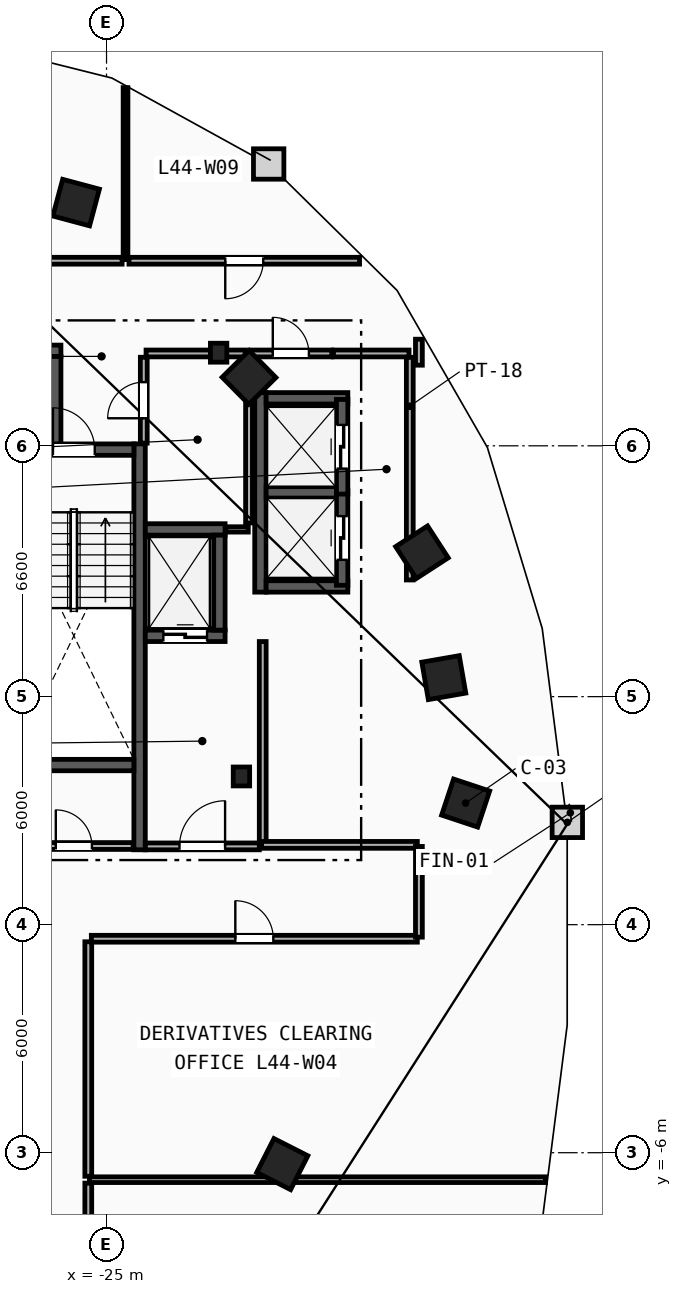
"""IFC4 building model, lengths in metres.
Left out: names, types, materials, properties, quantities, classifications, styles, units other than length and angle.
Written with IfcOpenShell. Run it as: python <this file> out.ifc"""

import sys

from ifc_helpers import new_model, si_unit, direction, frame, frame_2d, origin, origin_2d, place, context, subcontext, project, spatial, rectangle, i_section, extrude, element, fill, save


model = new_model("IFC4")
c1 = context("Model", 3, precision=1e-05, world=origin(), true_north=direction((0.0, 1.0)))
c2 = subcontext(c1, "Body", "Model", "MODEL_VIEW")
j1 = project(units=[si_unit("LENGTHUNIT", "METRE"), si_unit("PLANEANGLEUNIT", "RADIAN")], contexts=[c1])
p1 = place(None, origin())
s1 = spatial("IfcSite", under=j1, at=p1, CompositionType="ELEMENT")
p2 = place(p1, origin())
s2 = spatial("IfcBuilding", under=s1, at=p2, CompositionType="ELEMENT")
p3 = place(p2, frame((0.0, 0.0, 169.2)))
s3 = spatial("IfcBuildingStorey", under=s2, at=p3, CompositionType="ELEMENT", Elevation=169.2)
for number, where, z_axis, x_axis in (
    (1, (-21.45, 3.9, 0.0), (0.0, 0.0, 1.0), (1.0, 0.0, 0.0)),
    (2, (-22.05, 15.05, 0.0), (0.0, 0.0, 1.0), (1.0, 0.0, 0.0)),
):
    element("IfcColumn", number, at=place(p3, frame(where, z_axis=z_axis, x_axis=x_axis)), inside=s3, PredefinedType="COLUMN", context=c2, shape_type="SweptSolid", body=[
        extrude(i_section(OverallWidth=0.432, OverallDepth=0.498, WebThickness=0.056, FlangeThickness=0.089, FilletRadius=0.018, at=origin_2d()), origin(), (0.0, 0.0, 1.0), 3.6),
    ])
for number, where, z_axis, x_axis in (
    (3, (-15.55, 3.2, 0.0), (0.0, 0.0, 1.0), (0.315, 0.949, 0.0)),
    (4, (-16.125, 6.5, 0.0), (0.0, 0.0, 1.0), (-0.172, 0.985, 0.0)),
    (5, (-16.7, 9.8, 0.0), (0.0, 0.0, 1.0), (-0.544, 0.839, 0.0)),
    (6, (-21.25, 14.4, 0.0), (0.0, 0.0, 1.0), (-0.703, 0.711, 0.0)),
    (7, (-25.8, 19.0, 0.0), (0.0, 0.0, 1.0), (-0.966, 0.259, 0.0)),
    (8, (-20.375, -6.3, 0.0), (0.0, 0.0, 1.0), (0.453, 0.892, 0.0)),
):
    element("IfcColumn", number, at=place(p3, frame(where, z_axis=z_axis, x_axis=x_axis)), inside=s3, PredefinedType="COLUMN", context=c2, shape_type="SweptSolid", body=[
        extrude(rectangle(XDim=1.0, YDim=1.0, at=origin_2d()), origin(), (0.0, 0.0, 1.0), 3.6),
    ])
p4 = place(p3, frame((-24.13, 1.97, 0.0), z_axis=(0.0, 0.0, 1.0), x_axis=(0.0, 1.0, 0.0)))
e9 = element("IfcWall", 9, at=p4, inside=s3, PredefinedType="SHEAR", context=c2, shape_type="SweptSolid", body=[
    extrude(rectangle(XDim=10.68, YDim=0.3, at=frame_2d((5.34, 0.0))), origin(), (0.0, 0.0, 1.0), 3.36),
])
p5 = place(p3, frame((-27.44, 12.5, 0.0), z_axis=(0.0, 0.0, 1.0), x_axis=(1.0, 0.0, 0.0)))
e10 = element("IfcWall", 10, at=p5, inside=s3, PredefinedType="SHEAR", context=c2, shape_type="SweptSolid", body=[
    extrude(rectangle(XDim=3.16, YDim=0.3, at=frame_2d((1.58, 0.0))), origin(), (0.0, 0.0, 1.0), 3.36),
])
p6 = place(p5, frame((1.03, 0.0, 0.0)))
e11 = element("IfcOpeningElement", 11, at=p6, cuts=e10, PredefinedType="OPENING", context=c2, shape_type="SweptSolid", body=[
    extrude(rectangle(XDim=1.1, YDim=2.15, at=frame_2d((0.55, 1.075))), frame((0.0, 0.16, 0.0), z_axis=(0.0, -1.0, 0.0), x_axis=(1.0, 0.0, 0.0)), (0.0, 0.0, 1.0), 0.32),
])
p7 = place(p3, frame((-27.44, 4.2, 0.0), z_axis=(0.0, 0.0, 1.0), x_axis=(1.0, 0.0, 0.0)))
e12 = element("IfcWall", 12, at=p7, inside=s3, PredefinedType="SHEAR", context=c2, shape_type="SweptSolid", body=[
    extrude(rectangle(XDim=3.16, YDim=0.3, at=frame_2d((1.58, 0.0))), origin(), (0.0, 0.0, 1.0), 3.36),
])
p8 = place(p3, frame((-20.89, 2.15, 0.0), z_axis=(0.0, 0.0, 1.0), x_axis=(0.0, 1.0, 0.0)))
e13 = element("IfcWall", 13, at=p8, inside=s3, PredefinedType="PARTITIONING", context=c2, shape_type="SweptSolid", body=[
    extrude(rectangle(XDim=5.3, YDim=0.18, at=frame_2d((2.65, 0.0))), origin(), (0.0, 0.0, 1.0), 3.36),
])
p9 = place(p3, frame((-23.98, 2.06, 0.0), z_axis=(0.0, 0.0, 1.0), x_axis=(1.0, 0.0, 0.0)))
e14 = element("IfcWall", 14, at=p9, inside=s3, PredefinedType="PARTITIONING", context=c2, shape_type="SweptSolid", body=[
    extrude(rectangle(XDim=3.0, YDim=0.18, at=frame_2d((1.5, 0.0))), origin(), (0.0, 0.0, 1.0), 3.36),
])
p10 = place(p9, frame((0.9, 0.0, 0.0)))
e15 = element("IfcOpeningElement", 15, at=p10, cuts=e14, PredefinedType="OPENING", context=c2, shape_type="SweptSolid", body=[
    extrude(rectangle(XDim=1.2, YDim=2.15, at=frame_2d((0.6, 1.075))), frame((0.0, 0.1, 0.0), z_axis=(0.0, -1.0, 0.0), x_axis=(1.0, 0.0, 0.0)), (0.0, 0.0, 1.0), 0.2),
])
p11 = place(p3, frame((-23.98, 7.6, 0.0), z_axis=(0.0, 0.0, 1.0), x_axis=(1.0, 0.0, 0.0)))
e16 = element("IfcWall", 16, at=p11, inside=s3, PredefinedType="SHEAR", context=c2, shape_type="SweptSolid", body=[
    extrude(rectangle(XDim=2.1, YDim=0.3, at=frame_2d((1.05, 0.0))), origin(), (0.0, 0.0, 1.0), 3.36),
])
p12 = place(p11, frame((0.475, 0.0, 0.0)))
e17 = element("IfcOpeningElement", 17, at=p12, cuts=e16, PredefinedType="OPENING", context=c2, shape_type="SweptSolid", body=[
    extrude(rectangle(XDim=1.15, YDim=2.2, at=frame_2d((0.575, 1.1))), frame((0.0, 0.16, 0.0), z_axis=(0.0, -1.0, 0.0), x_axis=(1.0, 0.0, 0.0)), (0.0, 0.0, 1.0), 0.32),
])
p13 = place(p3, frame((-23.98, 10.4, 0.0), z_axis=(0.0, 0.0, 1.0), x_axis=(1.0, 0.0, 0.0)))
e18 = element("IfcWall", 18, at=p13, inside=s3, PredefinedType="SHEAR", context=c2, shape_type="SweptSolid", body=[
    extrude(rectangle(XDim=2.1, YDim=0.3, at=frame_2d((1.05, 0.0))), origin(), (0.0, 0.0, 1.0), 3.36),
])
for number, where, z_axis, x_axis in (
    (19, (-22.03, 7.75, 0.0), (0.0, 0.0, 1.0), (0.0, 1.0, 0.0)),
    (20, (-28.7, 15.1, 0.0), (0.0, 0.0, 1.0), (1.0, 0.0, 0.0)),
):
    element("IfcWall", number, at=place(p3, frame(where, z_axis=z_axis, x_axis=x_axis)), inside=s3, PredefinedType="SHEAR", context=c2, shape_type="SweptSolid", body=[
        extrude(rectangle(XDim=2.5, YDim=0.3, at=frame_2d((1.25, 0.0))), origin(), (0.0, 0.0, 1.0), 3.36),
    ])
p14 = place(p3, frame((-26.35, 12.65, 0.0), z_axis=(0.0, 0.0, 1.0), x_axis=(0.0, 1.0, 0.0)))
e21 = element("IfcWall", 21, at=p14, inside=s3, PredefinedType="SHEAR", context=c2, shape_type="SweptSolid", body=[
    extrude(rectangle(XDim=2.3, YDim=0.3, at=frame_2d((1.15, 0.0))), origin(), (0.0, 0.0, 1.0), 3.36),
])
p15 = place(p3, frame((-20.95, 8.75, 0.0), z_axis=(0.0, 0.0, 1.0), x_axis=(0.0, 1.0, 0.0)))
e22 = element("IfcWall", 22, at=p15, inside=s3, PredefinedType="SHEAR", context=c2, shape_type="SweptSolid", body=[
    extrude(rectangle(XDim=5.25, YDim=0.3, at=frame_2d((2.625, 0.0))), origin(), (0.0, 0.0, 1.0), 3.36),
])
for number, where, z_axis, x_axis in (
    (23, (-20.8, 8.9, 0.0), (0.0, 0.0, 1.0), (1.0, 0.0, 0.0)),
    (24, (-20.8, 13.85, 0.0), (0.0, 0.0, 1.0), (1.0, 0.0, 0.0)),
):
    element("IfcWall", number, at=place(p3, frame(where, z_axis=z_axis, x_axis=x_axis)), inside=s3, PredefinedType="SHEAR", context=c2, shape_type="SweptSolid", body=[
        extrude(rectangle(XDim=2.15, YDim=0.3, at=frame_2d((1.075, 0.0))), origin(), (0.0, 0.0, 1.0), 3.36),
    ])
p16 = place(p3, frame((-20.8, 11.375, 0.0), z_axis=(0.0, 0.0, 1.0), x_axis=(1.0, 0.0, 0.0)))
e25 = element("IfcWall", 25, at=p16, inside=s3, PredefinedType="SHEAR", context=c2, shape_type="SweptSolid", body=[
    extrude(rectangle(XDim=1.85, YDim=0.3, at=frame_2d((0.925, 0.0))), origin(), (0.0, 0.0, 1.0), 3.36),
])
p17 = place(p3, frame((-18.8, 8.93, 0.0), z_axis=(0.0, 0.0, 1.0), x_axis=(0.0, 1.0, 0.0)))
e26 = element("IfcWall", 26, at=p17, inside=s3, PredefinedType="SHEAR", context=c2, shape_type="SweptSolid", body=[
    extrude(rectangle(XDim=2.49, YDim=0.3, at=frame_2d((1.245, 0.0))), origin(), (0.0, 0.0, 1.0), 3.36),
])
p18 = place(p17, frame((0.67, 0.0, 0.0)))
e27 = element("IfcOpeningElement", 27, at=p18, cuts=e26, PredefinedType="OPENING", context=c2, shape_type="SweptSolid", body=[
    extrude(rectangle(XDim=1.15, YDim=2.2, at=frame_2d((0.575, 1.1))), frame((0.0, 0.16, 0.0), z_axis=(0.0, -1.0, 0.0), x_axis=(1.0, 0.0, 0.0)), (0.0, 0.0, 1.0), 0.32),
])
p19 = place(p3, frame((-18.8, 11.33, 0.0), z_axis=(0.0, 0.0, 1.0), x_axis=(0.0, 1.0, 0.0)))
e28 = element("IfcWall", 28, at=p19, inside=s3, PredefinedType="SHEAR", context=c2, shape_type="SweptSolid", body=[
    extrude(rectangle(XDim=2.49, YDim=0.3, at=frame_2d((1.245, 0.0))), origin(), (0.0, 0.0, 1.0), 3.36),
])
p20 = place(p19, frame((0.67, 0.0, 0.0)))
e29 = element("IfcOpeningElement", 29, at=p20, cuts=e28, PredefinedType="OPENING", context=c2, shape_type="SweptSolid", body=[
    extrude(rectangle(XDim=1.15, YDim=2.2, at=frame_2d((0.575, 1.1))), frame((0.0, 0.16, 0.0), z_axis=(0.0, -1.0, 0.0), x_axis=(1.0, 0.0, 0.0)), (0.0, 0.0, 1.0), 0.32),
])
p21 = place(p3, frame((-17.02, 9.07, 0.0), z_axis=(0.0, 0.0, 1.0), x_axis=(0.0, 1.0, 0.0)))
e30 = element("IfcWall", 30, at=p21, inside=s3, PredefinedType="PARTITIONING", context=c2, shape_type="SweptSolid", body=[
    extrude(rectangle(XDim=5.86, YDim=0.18, at=frame_2d((2.93, 0.0))), origin(), (0.0, 0.0, 1.0), 3.36),
])
p22 = place(p3, frame((-21.23, 15.03, 0.0), z_axis=(0.0, 0.0, 1.0), x_axis=(1.0, 0.0, 0.0)))
e31 = element("IfcWall", 31, at=p22, inside=s3, PredefinedType="PARTITIONING", context=c2, shape_type="SweptSolid", body=[
    extrude(rectangle(XDim=2.16, YDim=0.18, at=frame_2d((1.08, 0.0))), origin(), (0.0, 0.0, 1.0), 3.36),
])
p23 = place(p22, frame((0.605, 0.0, 0.0)))
e32 = element("IfcOpeningElement", 32, at=p23, cuts=e31, PredefinedType="OPENING", context=c2, shape_type="SweptSolid", body=[
    extrude(rectangle(XDim=0.95, YDim=2.1, at=frame_2d((0.475, 1.05))), frame((0.0, 0.1, 0.0), z_axis=(0.0, -1.0, 0.0), x_axis=(1.0, 0.0, 0.0)), (0.0, 0.0, 1.0), 0.2),
])
p24 = place(p3, frame((-19.03, 15.03, 0.0), z_axis=(0.0, 0.0, 1.0), x_axis=(1.0, 0.0, 0.0)))
e33 = element("IfcWall", 33, at=p24, inside=s3, PredefinedType="PARTITIONING", context=c2, shape_type="SweptSolid", body=[
    extrude(rectangle(XDim=1.99, YDim=0.18, at=frame_2d((0.995, 0.0))), origin(), (0.0, 0.0, 1.0), 3.36),
])
p25 = place(p3, frame((-21.86, 10.4, 0.0), z_axis=(0.0, 0.0, 1.0), x_axis=(1.0, 0.0, 0.0)))
e34 = element("IfcWall", 34, at=p25, inside=s3, PredefinedType="PARTITIONING", context=c2, shape_type="SweptSolid", body=[
    extrude(rectangle(XDim=0.59, YDim=0.14, at=frame_2d((0.295, 0.0))), origin(), (0.0, 0.0, 1.0), 3.36),
])
p26 = place(p3, frame((-21.25, 10.57, 0.0), z_axis=(0.0, 0.0, 1.0), x_axis=(0.0, 1.0, 0.0)))
e35 = element("IfcWall", 35, at=p26, inside=s3, PredefinedType="PARTITIONING", context=c2, shape_type="SweptSolid", body=[
    extrude(rectangle(XDim=4.36, YDim=0.18, at=frame_2d((2.18, 0.0))), origin(), (0.0, 0.0, 1.0), 3.36),
])
p27 = place(p3, frame((-23.96, 15.03, 0.0), z_axis=(0.0, 0.0, 1.0), x_axis=(1.0, 0.0, 0.0)))
e36 = element("IfcWall", 36, at=p27, inside=s3, PredefinedType="PARTITIONING", context=c2, shape_type="SweptSolid", body=[
    extrude(rectangle(XDim=2.61, YDim=0.18, at=frame_2d((1.305, 0.0))), origin(), (0.0, 0.0, 1.0), 2.433),
])
p28 = place(p3, frame((-27.42, 2.07, 0.0), z_axis=(0.0, 0.0, 1.0), x_axis=(1.0, 0.0, 0.0)))
e37 = element("IfcWall", 37, at=p28, inside=s3, PredefinedType="PARTITIONING", context=c2, shape_type="SweptSolid", body=[
    extrude(rectangle(XDim=3.12, YDim=0.18, at=frame_2d((1.56, 0.0))), origin(), (0.0, 0.0, 1.0), 3.36),
])
p29 = place(p28, frame((1.085, 0.0, 0.0)))
e38 = element("IfcOpeningElement", 38, at=p29, cuts=e37, PredefinedType="OPENING", context=c2, shape_type="SweptSolid", body=[
    extrude(rectangle(XDim=0.95, YDim=2.1, at=frame_2d((0.475, 1.05))), frame((0.0, 0.1, 0.0), z_axis=(0.0, -1.0, 0.0), x_axis=(1.0, 0.0, 0.0)), (0.0, 0.0, 1.0), 0.2),
])
p30 = place(p3, frame((-24.02, 12.67, 0.0), z_axis=(0.0, 0.0, 1.0), x_axis=(0.0, 1.0, 0.0)))
e39 = element("IfcWall", 39, at=p30, inside=s3, PredefinedType="PARTITIONING", context=c2, shape_type="SweptSolid", body=[
    extrude(rectangle(XDim=2.26, YDim=0.18, at=frame_2d((1.13, 0.0))), origin(), (0.0, 0.0, 1.0), 3.36),
])
p31 = place(p30, frame((0.655, 0.0, 0.0)))
e40 = element("IfcOpeningElement", 40, at=p31, cuts=e39, PredefinedType="OPENING", context=c2, shape_type="SweptSolid", body=[
    extrude(rectangle(XDim=0.95, YDim=2.1, at=frame_2d((0.475, 1.05))), frame((0.0, 0.1, 0.0), z_axis=(0.0, -1.0, 0.0), x_axis=(1.0, 0.0, 0.0)), (0.0, 0.0, 1.0), 0.2),
])
p32 = place(p3, frame((-25.45, -6.71, 0.0), z_axis=(0.0, 0.0, 1.0), x_axis=(1.0, 0.0, 0.0)))
e41 = element("IfcWall", 41, at=p32, inside=s3, PredefinedType="PARTITIONING", context=c2, shape_type="SweptSolid", body=[
    extrude(rectangle(XDim=12.003, YDim=0.15, at=frame_2d((6.001, 0.0))), origin(), (0.0, 0.0, 1.0), 3.36),
])
p33 = place(p3, frame((-24.5, 17.5, 0.0), z_axis=(0.0, 0.0, 1.0), x_axis=(0.0, 1.0, 0.0)))
e42 = element("IfcWall", 42, at=p33, inside=s3, PredefinedType="PARTITIONING", context=c2, shape_type="SweptSolid", body=[
    extrude(rectangle(XDim=4.525, YDim=0.125, at=frame_2d((2.263, 0.0))), origin(), (0.0, 0.0, 1.0), 3.36),
])
p34 = place(p3, frame((-25.48, -11.178, 0.0), z_axis=(0.0, 0.0, 1.0), x_axis=(0.0, 1.0, 0.0)))
e43 = element("IfcWall", 43, at=p34, inside=s3, PredefinedType="PARTITIONING", context=c2, shape_type="SweptSolid", body=[
    extrude(rectangle(XDim=4.378, YDim=0.18, at=frame_2d((2.189, 0.0))), origin(), (0.0, 0.0, 1.0), 3.36),
])
p35 = place(p3, frame((-25.4, -0.37, 0.0), z_axis=(0.0, 0.0, 1.0), x_axis=(1.0, 0.0, 0.0)))
e44 = element("IfcWall", 44, at=p35, inside=s3, PredefinedType="PARTITIONING", context=c2, shape_type="SweptSolid", body=[
    extrude(rectangle(XDim=8.578, YDim=0.18, at=frame_2d((4.289, 0.0))), origin(), (0.0, 0.0, 1.0), 3.36),
])
p36 = place(p35, frame((3.789, 0.0, 0.0)))
e45 = element("IfcOpeningElement", 45, at=p36, cuts=e44, PredefinedType="OPENING", context=c2, shape_type="SweptSolid", body=[
    extrude(rectangle(XDim=1.0, YDim=2.15, at=frame_2d((0.5, 1.075))), frame((0.0, 0.1, 0.0), z_axis=(0.0, -1.0, 0.0), x_axis=(1.0, 0.0, 0.0)), (0.0, 0.0, 1.0), 0.2),
])
p37 = place(p3, frame((-25.48, -6.62, 0.0), z_axis=(0.0, 0.0, 1.0), x_axis=(0.0, 1.0, 0.0)))
e46 = element("IfcWall", 46, at=p37, inside=s3, PredefinedType="PARTITIONING", context=c2, shape_type="SweptSolid", body=[
    extrude(rectangle(XDim=6.17, YDim=0.18, at=frame_2d((3.085, 0.0))), origin(), (0.0, 0.0, 1.0), 3.36),
])
p38 = place(p3, frame((-16.822, 2.1, 0.0), z_axis=(0.0, 0.0, 1.0), x_axis=(-1.0, 0.0, 0.0)))
e47 = element("IfcWall", 47, at=p38, inside=s3, PredefinedType="PARTITIONING", context=c2, shape_type="SweptSolid", body=[
    extrude(rectangle(XDim=4.098, YDim=0.18, at=frame_2d((2.049, 0.0))), origin(), (0.0, 0.0, 1.0), 3.36),
])
p39 = place(p3, frame((-16.78, -0.329, 0.0), z_axis=(0.0, 0.0, 1.0), x_axis=(0.0, 1.0, 0.0)))
e48 = element("IfcWall", 48, at=p39, inside=s3, PredefinedType="PARTITIONING", context=c2, shape_type="SweptSolid", body=[
    extrude(rectangle(XDim=2.387, YDim=0.18, at=frame_2d((1.194, 0.0))), origin(), (0.0, 0.0, 1.0), 3.36),
])
p40 = place(p3, frame((-16.78, 14.721, 0.0), z_axis=(0.0, 0.0, 1.0), x_axis=(0.0, 1.0, 0.0)))
e49 = element("IfcWall", 49, at=p40, inside=s3, PredefinedType="PARTITIONING", context=c2, shape_type="SweptSolid", body=[
    extrude(rectangle(XDim=0.684, YDim=0.18, at=frame_2d((0.342, 0.0))), origin(), (0.0, 0.0, 1.0), 3.36),
])
p41 = place(p3, frame((-18.342, 17.47, 0.0), z_axis=(0.0, 0.0, 1.0), x_axis=(-1.0, 0.0, 0.0)))
e50 = element("IfcWall", 50, at=p41, inside=s3, PredefinedType="PARTITIONING", context=c2, shape_type="SweptSolid", body=[
    extrude(rectangle(XDim=6.068, YDim=0.18, at=frame_2d((3.034, 0.0))), origin(), (0.0, 0.0, 1.0), 3.36),
])
p42 = place(p41, frame((2.534, 0.0, 0.0)))
e51 = element("IfcOpeningElement", 51, at=p42, cuts=e50, PredefinedType="OPENING", context=c2, shape_type="SweptSolid", body=[
    extrude(rectangle(XDim=1.0, YDim=2.15, at=frame_2d((0.5, 1.075))), frame((0.0, 0.1, 0.0), z_axis=(0.0, -1.0, 0.0), x_axis=(1.0, 0.0, 0.0)), (0.0, 0.0, 1.0), 0.2),
])
p43 = place(p3, frame((-24.59, 17.47, 0.0), z_axis=(0.0, 0.0, 1.0), x_axis=(-1.0, 0.0, 0.0)))
e52 = element("IfcWall", 52, at=p43, inside=s3, PredefinedType="PARTITIONING", context=c2, shape_type="SweptSolid", body=[
    extrude(rectangle(XDim=6.82, YDim=0.18, at=frame_2d((3.41, 0.0))), origin(), (0.0, 0.0, 1.0), 3.36),
])
p44 = place(p43, frame((2.91, 0.0, 0.0)))
e53 = element("IfcOpeningElement", 53, at=p44, cuts=e52, PredefinedType="OPENING", context=c2, shape_type="SweptSolid", body=[
    extrude(rectangle(XDim=1.0, YDim=2.15, at=frame_2d((0.5, 1.075))), frame((0.0, 0.1, 0.0), z_axis=(0.0, -1.0, 0.0), x_axis=(1.0, 0.0, 0.0)), (0.0, 0.0, 1.0), 0.2),
])
p45 = place(p6, origin())
e54 = element("IfcDoor", 54, at=p45, inside=s3, OperationType="SINGLE_SWING_LEFT", PredefinedType="DOOR", context=c2, shape_type="SweptSolid", body=[
    extrude(rectangle(XDim=1.1, YDim=2.15, at=frame_2d((0.55, 1.075))), frame((0.0, 0.025, 0.0), z_axis=(0.0, -1.0, 0.0), x_axis=(1.0, 0.0, 0.0)), (0.0, 0.0, 1.0), 0.05),
])
fill(e11, e54)
p46 = place(p10, origin())
e55 = element("IfcDoor", 55, at=p46, inside=s3, OperationType="SINGLE_SWING_RIGHT", PredefinedType="DOOR", context=c2, shape_type="SweptSolid", body=[
    extrude(rectangle(XDim=1.2, YDim=2.15, at=frame_2d((0.6, 1.075))), frame((0.0, 0.025, 0.0), z_axis=(0.0, -1.0, 0.0), x_axis=(1.0, 0.0, 0.0)), (0.0, 0.0, 1.0), 0.05),
])
fill(e15, e55)
p47 = place(p12, origin())
e56 = element("IfcDoor", 56, at=p47, inside=s3, OperationType="SLIDING_TO_LEFT", PredefinedType="TRAPDOOR", context=c2, shape_type="SweptSolid", body=[
    extrude(rectangle(XDim=1.15, YDim=2.2, at=frame_2d((0.575, 1.1))), frame((0.0, 0.025, 0.0), z_axis=(0.0, -1.0, 0.0), x_axis=(1.0, 0.0, 0.0)), (0.0, 0.0, 1.0), 0.05),
])
fill(e17, e56)
p48 = place(p18, origin())
e57 = element("IfcDoor", 57, at=p48, inside=s3, OperationType="SLIDING_TO_LEFT", PredefinedType="TRAPDOOR", context=c2, shape_type="SweptSolid", body=[
    extrude(rectangle(XDim=1.15, YDim=2.2, at=frame_2d((0.575, 1.1))), frame((0.0, 0.025, 0.0), z_axis=(0.0, -1.0, 0.0), x_axis=(1.0, 0.0, 0.0)), (0.0, 0.0, 1.0), 0.05),
])
fill(e27, e57)
p49 = place(p20, origin())
e58 = element("IfcDoor", 58, at=p49, inside=s3, OperationType="SLIDING_TO_LEFT", PredefinedType="TRAPDOOR", context=c2, shape_type="SweptSolid", body=[
    extrude(rectangle(XDim=1.15, YDim=2.2, at=frame_2d((0.575, 1.1))), frame((0.0, 0.025, 0.0), z_axis=(0.0, -1.0, 0.0), x_axis=(1.0, 0.0, 0.0)), (0.0, 0.0, 1.0), 0.05),
])
fill(e29, e58)
p50 = place(p36, origin())
e59 = element("IfcDoor", 59, at=p50, inside=s3, OperationType="SINGLE_SWING_LEFT", PredefinedType="DOOR", context=c2, shape_type="SweptSolid", body=[
    extrude(rectangle(XDim=1.0, YDim=2.15, at=frame_2d((0.5, 1.075))), frame((0.0, 0.025, 0.0), z_axis=(0.0, -1.0, 0.0), x_axis=(1.0, 0.0, 0.0)), (0.0, 0.0, 1.0), 0.05),
])
fill(e45, e59)
p51 = place(p42, origin())
e60 = element("IfcDoor", 60, at=p51, inside=s3, OperationType="SINGLE_SWING_RIGHT", PredefinedType="DOOR", context=c2, shape_type="SweptSolid", body=[
    extrude(rectangle(XDim=1.0, YDim=2.15, at=frame_2d((0.5, 1.075))), frame((0.0, 0.025, 0.0), z_axis=(0.0, -1.0, 0.0), x_axis=(1.0, 0.0, 0.0)), (0.0, 0.0, 1.0), 0.05),
])
fill(e51, e60)
p52 = place(p29, origin())
e61 = element("IfcDoor", 61, at=p52, inside=s3, OperationType="SINGLE_SWING_LEFT", PredefinedType="DOOR", context=c2, shape_type="SweptSolid", body=[
    extrude(rectangle(XDim=0.95, YDim=2.1, at=frame_2d((0.475, 1.05))), frame((0.0, 0.025, 0.0), z_axis=(0.0, -1.0, 0.0), x_axis=(1.0, 0.0, 0.0)), (0.0, 0.0, 1.0), 0.05),
])
fill(e38, e61)
p53 = place(p31, origin())
e62 = element("IfcDoor", 62, at=p53, inside=s3, OperationType="SINGLE_SWING_LEFT", PredefinedType="DOOR", context=c2, shape_type="SweptSolid", body=[
    extrude(rectangle(XDim=0.95, YDim=2.1, at=frame_2d((0.475, 1.05))), frame((0.0, 0.025, 0.0), z_axis=(0.0, -1.0, 0.0), x_axis=(1.0, 0.0, 0.0)), (0.0, 0.0, 1.0), 0.05),
])
fill(e40, e62)
p54 = place(p23, origin())
e63 = element("IfcDoor", 63, at=p54, inside=s3, OperationType="SINGLE_SWING_LEFT", PredefinedType="DOOR", context=c2, shape_type="SweptSolid", body=[
    extrude(rectangle(XDim=0.95, YDim=2.1, at=frame_2d((0.475, 1.05))), frame((0.0, 0.025, 0.0), z_axis=(0.0, -1.0, 0.0), x_axis=(1.0, 0.0, 0.0)), (0.0, 0.0, 1.0), 0.05),
])
fill(e32, e63)
save(model, sys.argv[1])
